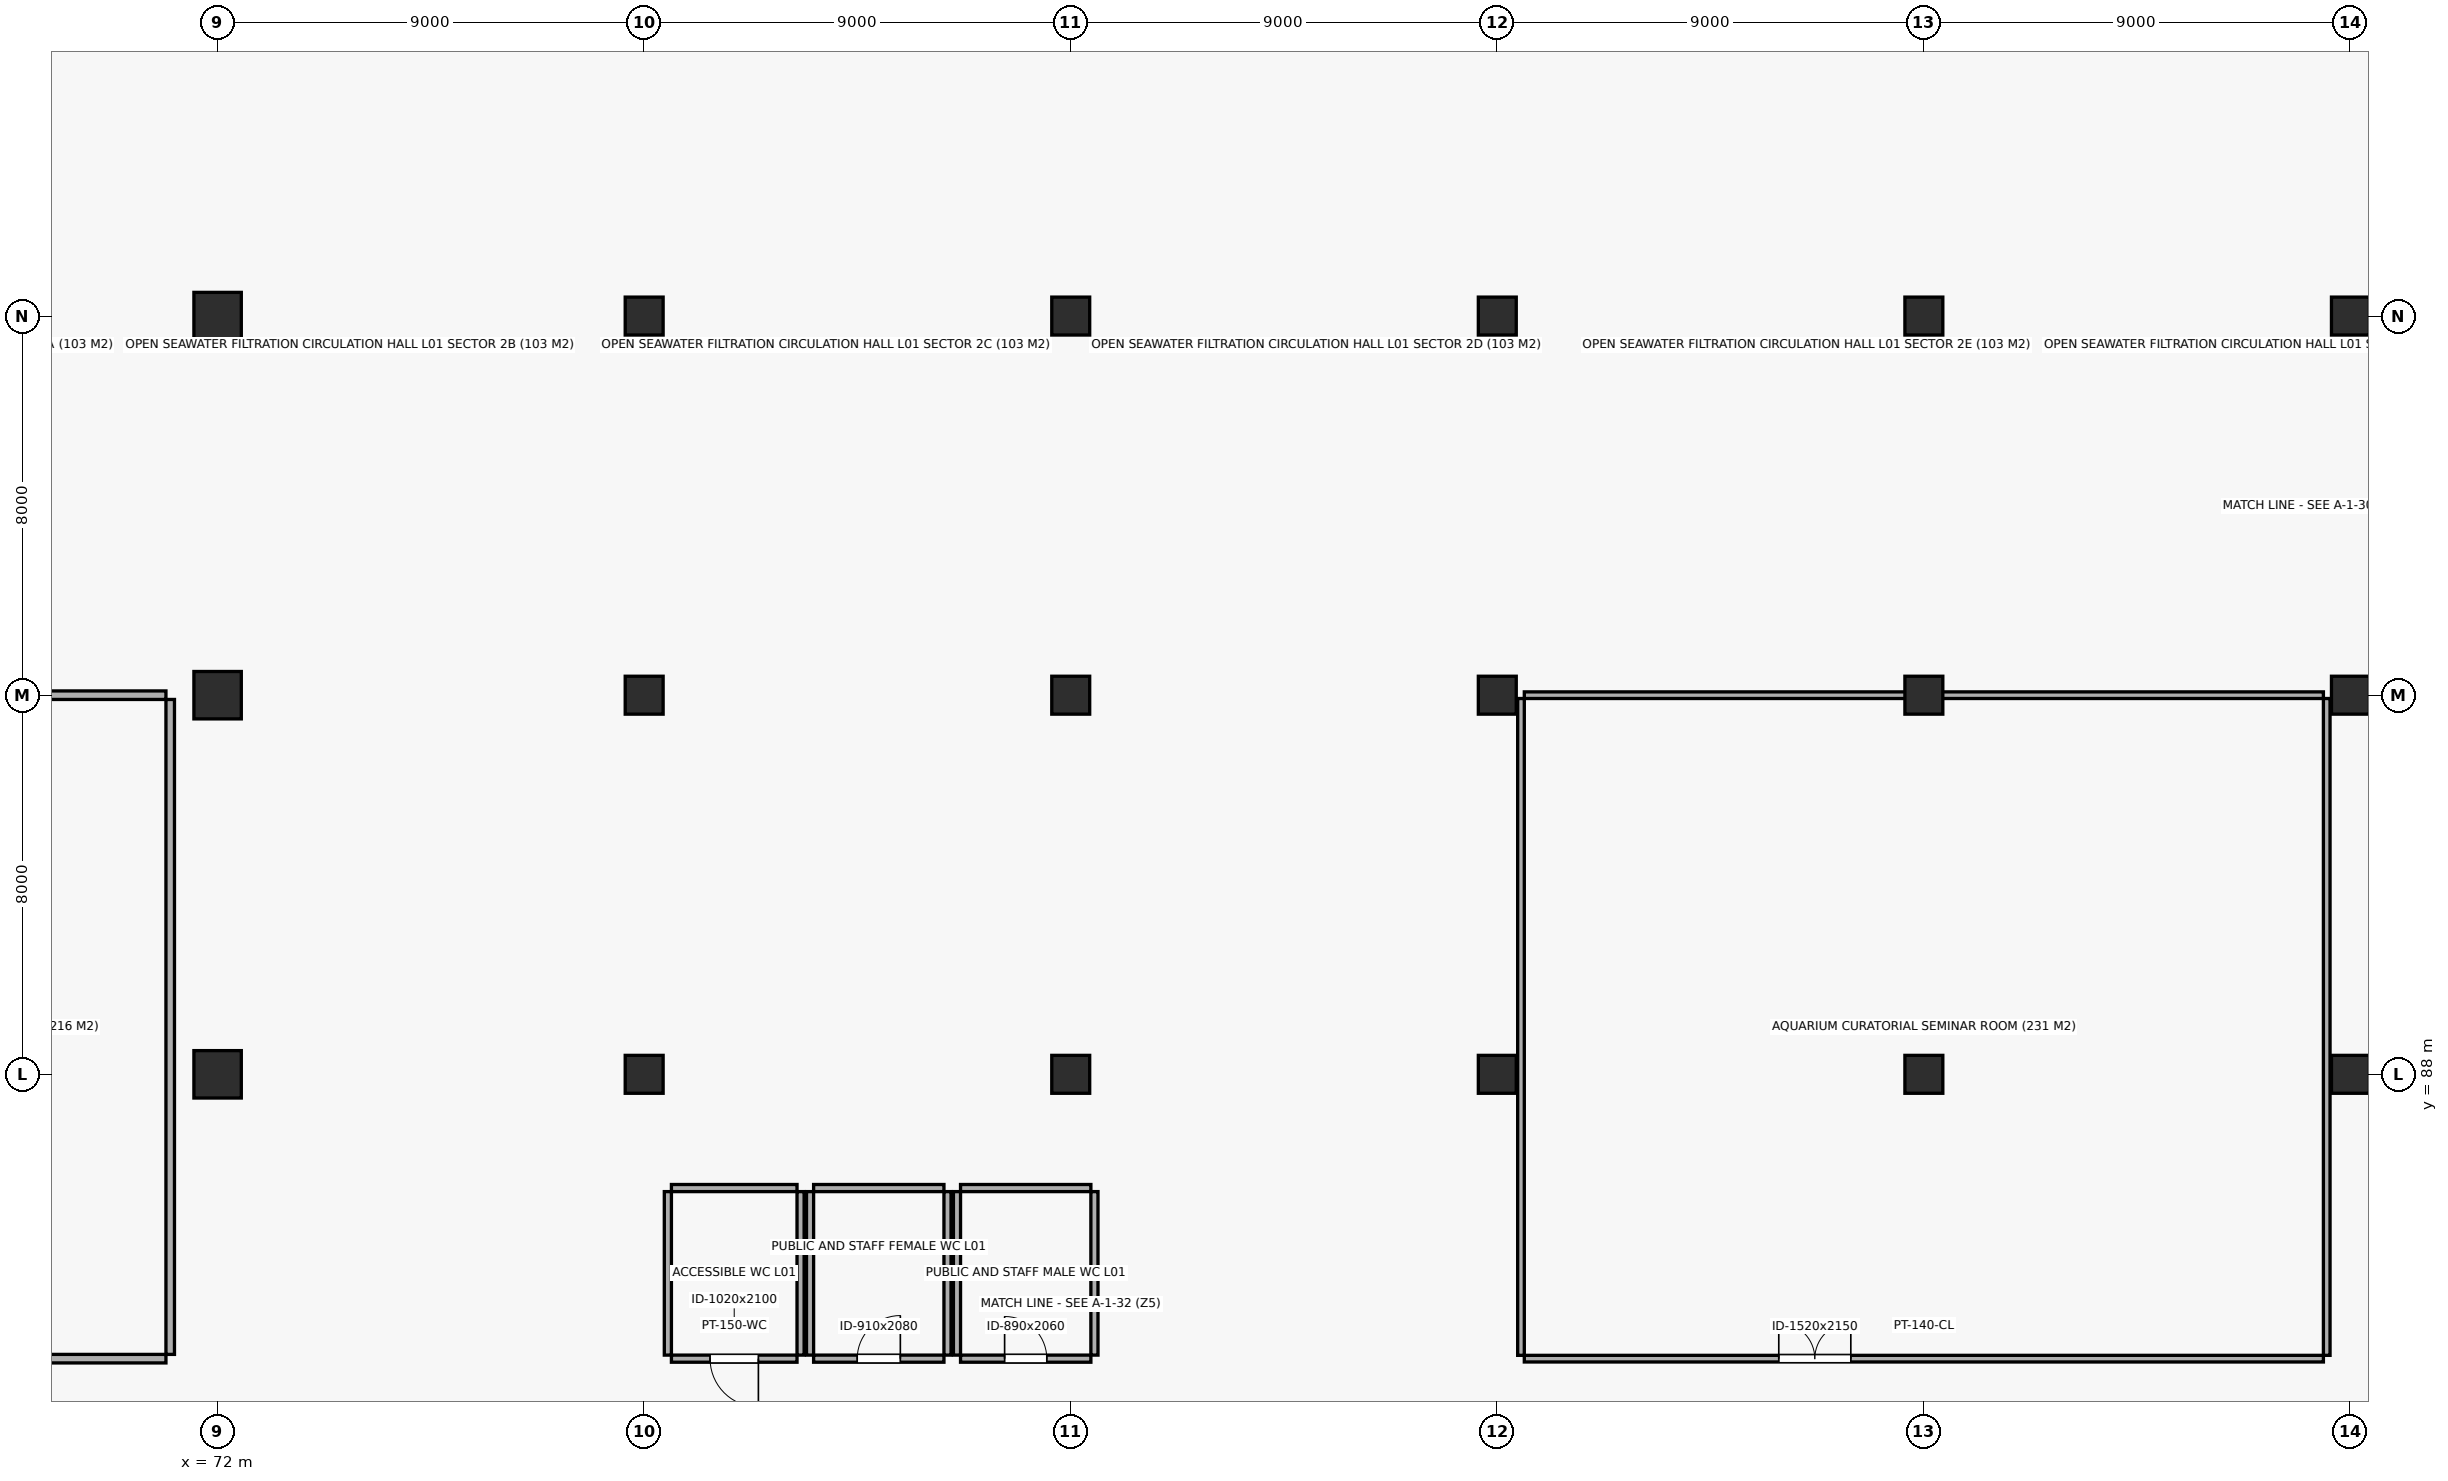
"""IFC4 building model, lengths in metres.
Left out: names, types, materials, properties, quantities, classifications, styles, units other than length and angle.
Written with IfcOpenShell. Run it as: python <this file> out.ifc"""

import sys

from ifc_helpers import new_model, si_unit, direction, frame, frame_2d, origin, origin_2d, place, context, subcontext, project, spatial, rectangle, extrude, element, fill, save


model = new_model("IFC4")
c1 = context("Model", 3, precision=1e-05, world=origin(), true_north=direction((0.0, 1.0)))
c2 = subcontext(c1, "Body", "Model", "MODEL_VIEW")
j1 = project(units=[si_unit("LENGTHUNIT", "METRE"), si_unit("PLANEANGLEUNIT", "RADIAN")], contexts=[c1])
p1 = place(None, origin())
s1 = spatial("IfcSite", under=j1, at=p1, CompositionType="ELEMENT")
p2 = place(p1, origin())
s2 = spatial("IfcBuilding", under=s1, at=p2, CompositionType="ELEMENT")
p3 = place(p2, frame((0.0, 0.0, 4.5)))
s3 = spatial("IfcBuildingStorey", under=s2, at=p3, CompositionType="ELEMENT", Elevation=4.5)
for number, where, z_axis, x_axis in (
    (1, (72.0, 88.0, 0.0), (0.0, 0.0, 1.0), (1.0, 0.0, 0.0)),
    (2, (72.0, 96.0, 0.0), (0.0, 0.0, 1.0), (1.0, 0.0, 0.0)),
    (3, (72.0, 104.0, 0.0), (0.0, 0.0, 1.0), (1.0, 0.0, 0.0)),
):
    element("IfcColumn", number, at=place(p3, frame(where, z_axis=z_axis, x_axis=x_axis)), inside=s3, PredefinedType="COLUMN", context=c2, shape_type="SweptSolid", body=[
        extrude(rectangle(XDim=1.0, YDim=1.0, at=origin_2d()), origin(), (0.0, 0.0, 1.0), 4.5),
    ])
for number, where, z_axis, x_axis in (
    (4, (81.0, 88.0, 0.0), (0.0, 0.0, 1.0), (1.0, 0.0, 0.0)),
    (5, (81.0, 96.0, 0.0), (0.0, 0.0, 1.0), (1.0, 0.0, 0.0)),
    (6, (81.0, 104.0, 0.0), (0.0, 0.0, 1.0), (1.0, 0.0, 0.0)),
    (7, (90.0, 88.0, 0.0), (0.0, 0.0, 1.0), (1.0, 0.0, 0.0)),
    (8, (90.0, 96.0, 0.0), (0.0, 0.0, 1.0), (1.0, 0.0, 0.0)),
    (9, (90.0, 104.0, 0.0), (0.0, 0.0, 1.0), (1.0, 0.0, 0.0)),
    (10, (99.0, 88.0, 0.0), (0.0, 0.0, 1.0), (1.0, 0.0, 0.0)),
    (11, (99.0, 96.0, 0.0), (0.0, 0.0, 1.0), (1.0, 0.0, 0.0)),
    (12, (99.0, 104.0, 0.0), (0.0, 0.0, 1.0), (1.0, 0.0, 0.0)),
    (13, (108.0, 88.0, 0.0), (0.0, 0.0, 1.0), (1.0, 0.0, 0.0)),
    (14, (108.0, 96.0, 0.0), (0.0, 0.0, 1.0), (1.0, 0.0, 0.0)),
    (15, (108.0, 104.0, 0.0), (0.0, 0.0, 1.0), (1.0, 0.0, 0.0)),
    (16, (117.0, 88.0, 0.0), (0.0, 0.0, 1.0), (1.0, 0.0, 0.0)),
    (17, (117.0, 96.0, 0.0), (0.0, 0.0, 1.0), (1.0, 0.0, 0.0)),
    (18, (117.0, 104.0, 0.0), (0.0, 0.0, 1.0), (1.0, 0.0, 0.0)),
):
    element("IfcColumn", number, at=place(p3, frame(where, z_axis=z_axis, x_axis=x_axis)), inside=s3, PredefinedType="COLUMN", context=c2, shape_type="SweptSolid", body=[
        extrude(rectangle(XDim=0.8, YDim=0.8, at=origin_2d()), origin(), (0.0, 0.0, 1.0), 4.5),
    ])
p4 = place(p3, frame((55.09, 82.0, 0.0), z_axis=(0.0, 0.0, 1.0), x_axis=(1.0, 0.0, 0.0)))
e19 = element("IfcWall", 19, at=p4, inside=s3, PredefinedType="PARTITIONING", context=c2, shape_type="SweptSolid", body=[
    extrude(rectangle(XDim=15.82, YDim=0.18, at=frame_2d((7.91, 0.0))), origin(), (0.0, 0.0, 1.0), 4.18),
])
p5 = place(p4, frame((5.026, 0.0, 0.0)))
e20 = element("IfcOpeningElement", 20, at=p5, cuts=e19, PredefinedType="OPENING", context=c2, shape_type="SweptSolid", body=[
    extrude(rectangle(XDim=1.46, YDim=2.15, at=frame_2d((0.73, 1.075))), frame((0.0, 0.102, 0.0), z_axis=(0.0, -1.0, 0.0), x_axis=(1.0, 0.0, 0.0)), (0.0, 0.0, 1.0), 0.204),
])
p6 = place(p3, frame((55.09, 96.0, 0.0), z_axis=(0.0, 0.0, 1.0), x_axis=(1.0, 0.0, 0.0)))
e21 = element("IfcWall", 21, at=p6, inside=s3, PredefinedType="PARTITIONING", context=c2, shape_type="SweptSolid", body=[
    extrude(rectangle(XDim=15.82, YDim=0.18, at=frame_2d((7.91, 0.0))), origin(), (0.0, 0.0, 1.0), 3.33),
])
p7 = place(p3, frame((71.0, 82.09, 0.0), z_axis=(0.0, 0.0, 1.0), x_axis=(0.0, 1.0, 0.0)))
e22 = element("IfcWall", 22, at=p7, inside=s3, PredefinedType="PARTITIONING", context=c2, shape_type="SweptSolid", body=[
    extrude(rectangle(XDim=13.82, YDim=0.18, at=frame_2d((6.91, 0.0))), origin(), (0.0, 0.0, 1.0), 4.18),
])
p8 = place(p3, frame((99.57, 82.0, 0.0), z_axis=(0.0, 0.0, 1.0), x_axis=(1.0, 0.0, 0.0)))
e23 = element("IfcWall", 23, at=p8, inside=s3, PredefinedType="PARTITIONING", context=c2, shape_type="SweptSolid", body=[
    extrude(rectangle(XDim=16.86, YDim=0.14, at=frame_2d((8.43, 0.0))), origin(), (0.0, 0.0, 1.0), 4.18),
])
p9 = place(p8, frame((5.369, 0.0, 0.0)))
e24 = element("IfcOpeningElement", 24, at=p9, cuts=e23, PredefinedType="OPENING", context=c2, shape_type="SweptSolid", body=[
    extrude(rectangle(XDim=1.52, YDim=2.15, at=frame_2d((0.76, 1.075))), frame((0.0, 0.082, 0.0), z_axis=(0.0, -1.0, 0.0), x_axis=(1.0, 0.0, 0.0)), (0.0, 0.0, 1.0), 0.164),
])
p10 = place(p3, frame((99.57, 96.0, 0.0), z_axis=(0.0, 0.0, 1.0), x_axis=(1.0, 0.0, 0.0)))
e25 = element("IfcWall", 25, at=p10, inside=s3, PredefinedType="PARTITIONING", context=c2, shape_type="SweptSolid", body=[
    extrude(rectangle(XDim=16.86, YDim=0.14, at=frame_2d((8.43, 0.0))), origin(), (0.0, 0.0, 1.0), 3.33),
])
for number, where, z_axis, x_axis in (
    (26, (99.5, 82.07, 0.0), (0.0, 0.0, 1.0), (0.0, 1.0, 0.0)),
    (27, (116.5, 82.07, 0.0), (0.0, 0.0, 1.0), (0.0, 1.0, 0.0)),
):
    element("IfcWall", number, at=place(p3, frame(where, z_axis=z_axis, x_axis=x_axis)), inside=s3, PredefinedType="PARTITIONING", context=c2, shape_type="SweptSolid", body=[
        extrude(rectangle(XDim=13.86, YDim=0.14, at=frame_2d((6.93, 0.0))), origin(), (0.0, 0.0, 1.0), 4.18),
    ])
p11 = place(p3, frame((81.575, 82.0, 0.0), z_axis=(0.0, 0.0, 1.0), x_axis=(1.0, 0.0, 0.0)))
e28 = element("IfcWall", 28, at=p11, inside=s3, PredefinedType="PARTITIONING", context=c2, shape_type="SweptSolid", body=[
    extrude(rectangle(XDim=2.65, YDim=0.15, at=frame_2d((1.325, 0.0))), origin(), (0.0, 0.0, 1.0), 4.18),
])
p12 = place(p11, frame((0.815, 0.0, 0.0)))
e29 = element("IfcOpeningElement", 29, at=p12, cuts=e28, PredefinedType="OPENING", context=c2, shape_type="SweptSolid", body=[
    extrude(rectangle(XDim=1.02, YDim=2.1, at=frame_2d((0.51, 1.05))), frame((0.0, 0.087, 0.0), z_axis=(0.0, -1.0, 0.0), x_axis=(1.0, 0.0, 0.0)), (0.0, 0.0, 1.0), 0.174),
])
p13 = place(p3, frame((81.575, 85.6, 0.0), z_axis=(0.0, 0.0, 1.0), x_axis=(1.0, 0.0, 0.0)))
e30 = element("IfcWall", 30, at=p13, inside=s3, PredefinedType="PARTITIONING", context=c2, shape_type="SweptSolid", body=[
    extrude(rectangle(XDim=2.65, YDim=0.15, at=frame_2d((1.325, 0.0))), origin(), (0.0, 0.0, 1.0), 4.18),
])
for number, where, z_axis, x_axis in (
    (31, (81.5, 82.075, 0.0), (0.0, 0.0, 1.0), (0.0, 1.0, 0.0)),
    (32, (84.3, 82.075, 0.0), (0.0, 0.0, 1.0), (0.0, 1.0, 0.0)),
):
    element("IfcWall", number, at=place(p3, frame(where, z_axis=z_axis, x_axis=x_axis)), inside=s3, PredefinedType="PARTITIONING", context=c2, shape_type="SweptSolid", body=[
        extrude(rectangle(XDim=3.45, YDim=0.15, at=frame_2d((1.725, 0.0))), origin(), (0.0, 0.0, 1.0), 4.18),
    ])
p14 = place(p3, frame((84.575, 82.0, 0.0), z_axis=(0.0, 0.0, 1.0), x_axis=(1.0, 0.0, 0.0)))
e33 = element("IfcWall", 33, at=p14, inside=s3, PredefinedType="PARTITIONING", context=c2, shape_type="SweptSolid", body=[
    extrude(rectangle(XDim=2.75, YDim=0.15, at=frame_2d((1.375, 0.0))), origin(), (0.0, 0.0, 1.0), 4.18),
])
p15 = place(p14, frame((0.92, 0.0, 0.0)))
e34 = element("IfcOpeningElement", 34, at=p15, cuts=e33, PredefinedType="OPENING", context=c2, shape_type="SweptSolid", body=[
    extrude(rectangle(XDim=0.91, YDim=2.08, at=frame_2d((0.455, 1.04))), frame((0.0, 0.087, 0.0), z_axis=(0.0, -1.0, 0.0), x_axis=(1.0, 0.0, 0.0)), (0.0, 0.0, 1.0), 0.174),
])
p16 = place(p3, frame((84.575, 85.6, 0.0), z_axis=(0.0, 0.0, 1.0), x_axis=(1.0, 0.0, 0.0)))
e35 = element("IfcWall", 35, at=p16, inside=s3, PredefinedType="PARTITIONING", context=c2, shape_type="SweptSolid", body=[
    extrude(rectangle(XDim=2.75, YDim=0.15, at=frame_2d((1.375, 0.0))), origin(), (0.0, 0.0, 1.0), 4.18),
])
for number, where, z_axis, x_axis in (
    (36, (84.5, 82.075, 0.0), (0.0, 0.0, 1.0), (0.0, 1.0, 0.0)),
    (37, (87.4, 82.075, 0.0), (0.0, 0.0, 1.0), (0.0, 1.0, 0.0)),
):
    element("IfcWall", number, at=place(p3, frame(where, z_axis=z_axis, x_axis=x_axis)), inside=s3, PredefinedType="PARTITIONING", context=c2, shape_type="SweptSolid", body=[
        extrude(rectangle(XDim=3.45, YDim=0.15, at=frame_2d((1.725, 0.0))), origin(), (0.0, 0.0, 1.0), 4.18),
    ])
p17 = place(p3, frame((87.675, 82.0, 0.0), z_axis=(0.0, 0.0, 1.0), x_axis=(1.0, 0.0, 0.0)))
e38 = element("IfcWall", 38, at=p17, inside=s3, PredefinedType="PARTITIONING", context=c2, shape_type="SweptSolid", body=[
    extrude(rectangle(XDim=2.75, YDim=0.15, at=frame_2d((1.375, 0.0))), origin(), (0.0, 0.0, 1.0), 4.18),
])
p18 = place(p17, frame((0.93, 0.0, 0.0)))
e39 = element("IfcOpeningElement", 39, at=p18, cuts=e38, PredefinedType="OPENING", context=c2, shape_type="SweptSolid", body=[
    extrude(rectangle(XDim=0.89, YDim=2.06, at=frame_2d((0.445, 1.03))), frame((0.0, 0.087, 0.0), z_axis=(0.0, -1.0, 0.0), x_axis=(1.0, 0.0, 0.0)), (0.0, 0.0, 1.0), 0.174),
])
p19 = place(p3, frame((87.675, 85.6, 0.0), z_axis=(0.0, 0.0, 1.0), x_axis=(1.0, 0.0, 0.0)))
e40 = element("IfcWall", 40, at=p19, inside=s3, PredefinedType="PARTITIONING", context=c2, shape_type="SweptSolid", body=[
    extrude(rectangle(XDim=2.75, YDim=0.15, at=frame_2d((1.375, 0.0))), origin(), (0.0, 0.0, 1.0), 4.18),
])
for number, where, z_axis, x_axis in (
    (41, (87.6, 82.075, 0.0), (0.0, 0.0, 1.0), (0.0, 1.0, 0.0)),
    (42, (90.5, 82.075, 0.0), (0.0, 0.0, 1.0), (0.0, 1.0, 0.0)),
):
    element("IfcWall", number, at=place(p3, frame(where, z_axis=z_axis, x_axis=x_axis)), inside=s3, PredefinedType="PARTITIONING", context=c2, shape_type="SweptSolid", body=[
        extrude(rectangle(XDim=3.45, YDim=0.15, at=frame_2d((1.725, 0.0))), origin(), (0.0, 0.0, 1.0), 4.18),
    ])
p20 = place(p9, origin())
e43 = element("IfcDoor", 43, at=p20, inside=s3, OperationType="DOUBLE_DOOR_SINGLE_SWING", PredefinedType="DOOR", context=c2, shape_type="SweptSolid", body=[
    extrude(rectangle(XDim=1.52, YDim=2.15, at=frame_2d((0.76, 1.075))), frame((0.0, 0.025, 0.0), z_axis=(0.0, -1.0, 0.0), x_axis=(1.0, 0.0, 0.0)), (0.0, 0.0, 1.0), 0.05),
])
fill(e24, e43)
p21 = place(p12, frame((1.02, 0.0, 0.0), z_axis=(0.0, 0.0, 1.0), x_axis=(-1.0, 0.0, 0.0)))
e44 = element("IfcDoor", 44, at=p21, inside=s3, OperationType="SINGLE_SWING_LEFT", PredefinedType="DOOR", context=c2, shape_type="SweptSolid", body=[
    extrude(rectangle(XDim=1.02, YDim=2.1, at=frame_2d((0.51, 1.05))), frame((0.0, 0.025, 0.0), z_axis=(0.0, -1.0, 0.0), x_axis=(1.0, 0.0, 0.0)), (0.0, 0.0, 1.0), 0.05),
])
fill(e29, e44)
p22 = place(p15, origin())
e45 = element("IfcDoor", 45, at=p22, inside=s3, OperationType="SINGLE_SWING_RIGHT", PredefinedType="DOOR", context=c2, shape_type="SweptSolid", body=[
    extrude(rectangle(XDim=0.91, YDim=2.08, at=frame_2d((0.455, 1.04))), frame((0.0, 0.025, 0.0), z_axis=(0.0, -1.0, 0.0), x_axis=(1.0, 0.0, 0.0)), (0.0, 0.0, 1.0), 0.05),
])
fill(e34, e45)
p23 = place(p18, origin())
e46 = element("IfcDoor", 46, at=p23, inside=s3, OperationType="SINGLE_SWING_LEFT", PredefinedType="DOOR", context=c2, shape_type="SweptSolid", body=[
    extrude(rectangle(XDim=0.89, YDim=2.06, at=frame_2d((0.445, 1.03))), frame((0.0, 0.025, 0.0), z_axis=(0.0, -1.0, 0.0), x_axis=(1.0, 0.0, 0.0)), (0.0, 0.0, 1.0), 0.05),
])
fill(e39, e46)
save(model, sys.argv[1])
